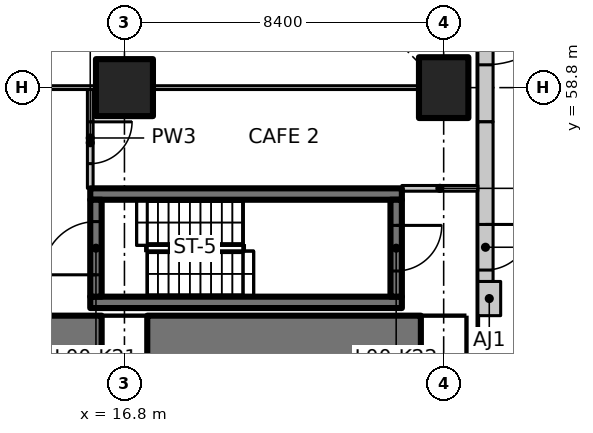
"""IFC4 building model, lengths in metres.
Left out: names, types, materials, properties, quantities, classifications, styles, units other than length and angle.
Written with IfcOpenShell. Run it as: python <this file> out.ifc"""

import sys

from ifc_helpers import new_model, si_unit, direction, frame, frame_2d, origin, origin_2d, place, context, subcontext, project, spatial, polyline, rectangle, outline, extrude, element, fill, save


model = new_model("IFC4")
c1 = context("Model", 3, precision=1e-05, world=origin(), true_north=direction((0.0, 1.0)))
c2 = subcontext(c1, "Body", "Model", "MODEL_VIEW")
j1 = project(units=[si_unit("LENGTHUNIT", "METRE"), si_unit("PLANEANGLEUNIT", "RADIAN")], contexts=[c1])
p1 = place(None, origin())
s1 = spatial("IfcSite", under=j1, at=p1, CompositionType="ELEMENT")
p2 = place(p1, origin())
s2 = spatial("IfcBuilding", under=s1, at=p2, CompositionType="ELEMENT")
p3 = place(p2, origin())
s3 = spatial("IfcBuildingStorey", under=s2, at=p3, CompositionType="ELEMENT", Elevation=0.0)
p4 = place(p3, frame((16.8, 58.8, 0.0), z_axis=(0.0, 0.0, 1.0), x_axis=(1.0, 0.0, 0.0)))
e1 = element("IfcColumn", 1, at=p4, inside=s3, PredefinedType="COLUMN", context=c2, shape_type="SweptSolid", body=[
    extrude(rectangle(XDim=1.5, YDim=1.5, at=origin_2d()), origin(), (0.0, 0.0, 1.0), 6.75),
])
p5 = place(p3, frame((25.2, 58.8, 0.0), z_axis=(0.0, 0.0, 1.0), x_axis=(1.0, 0.0, 0.0)))
e2 = element("IfcColumn", 2, at=p5, inside=s3, PredefinedType="COLUMN", context=c2, shape_type="SweptSolid", body=[
    extrude(rectangle(XDim=1.3, YDim=1.6, at=origin_2d()), origin(), (0.0, 0.0, 1.0), 6.75),
])
for number, where, z_axis, x_axis in (
    (3, (16.2, 42.0, 0.0), (1.0, 0.0, 0.0), (0.0, 1.0, 0.0)),
    (4, (24.6, 42.0, 0.0), (1.0, 0.0, 0.0), (0.0, 1.0, 0.0)),
):
    element("IfcWall", number, at=place(p3, frame(where, z_axis=z_axis, x_axis=x_axis)), inside=s3, PredefinedType="SOLIDWALL", context=c2, shape_type="SweptSolid", body=[
        extrude(outline(polyline([(-10.8, -6.3), (10.8, -6.3), (10.8, 36.25), (-10.8, 36.25), (-10.8, -6.3)]), holes=[polyline([(-8.4, 0.0), (-8.4, 26.6), (-8.36, 27.423), (-8.239, 28.239), (-8.038, 29.038), (-7.76, 29.814), (-7.408, 30.56), (-6.984, 31.267), (-6.493, 31.929), (-5.94, 32.54), (-5.329, 33.093), (-4.667, 33.584), (-3.96, 34.008), (-3.215, 34.361), (-2.438, 34.638), (-1.639, 34.839), (-0.823, 34.959), (0.0, 35.0), (0.823, 34.959), (1.639, 34.839), (2.438, 34.638), (3.215, 34.361), (3.96, 34.008), (4.667, 33.584), (5.329, 33.093), (5.94, 32.54), (6.493, 31.929), (6.984, 31.267), (7.408, 30.56), (7.76, 29.814), (8.038, 29.038), (8.239, 28.239), (8.36, 27.423), (8.4, 26.6), (8.4, 0.0), (-8.4, 0.0)])]), origin(), (0.0, 0.0, 1.0), 1.2),
    ])
p6 = place(p3, frame((9.0, 51.6, -6.3), z_axis=(0.0, 0.0, 1.0), x_axis=(1.0, 0.0, 0.0)))
e5 = element("IfcWall", 5, at=p6, inside=s3, PredefinedType="SOLIDWALL", context=c2, shape_type="SweptSolid", body=[
    extrude(rectangle(XDim=7.2, YDim=2.4, at=frame_2d((3.6, 0.0))), origin(), (0.0, 0.0, 1.0), 42.55),
])
p7 = place(p3, frame((17.4, 51.6, -6.3), z_axis=(0.0, 0.0, 1.0), x_axis=(1.0, 0.0, 0.0)))
e6 = element("IfcWall", 6, at=p7, inside=s3, PredefinedType="SOLIDWALL", context=c2, shape_type="SweptSolid", body=[
    extrude(rectangle(XDim=7.2, YDim=2.4, at=frame_2d((3.6, 0.0))), origin(), (0.0, 0.0, 1.0), 42.55),
])
p8 = place(p3, frame((25.8, 42.0, 0.0), z_axis=(1.0, 0.0, 0.0), x_axis=(0.0, 1.0, 0.0)))
e7 = element("IfcWall", 7, at=p8, inside=s3, PredefinedType="SOLIDWALL", context=c2, shape_type="SweptSolid", body=[
    extrude(outline(polyline([(5.4, 35.953), (6.0, 35.58), (6.575, 35.168), (7.121, 34.72), (7.637, 34.237), (8.12, 33.721), (8.568, 33.175), (8.98, 32.6), (9.353, 32.0), (9.686, 31.377), (9.978, 30.733), (10.227, 30.072), (10.432, 29.395), (10.593, 28.707), (10.708, 28.01), (10.777, 27.306), (10.8, 26.6), (10.8, 0.0), (8.4, 0.0), (8.4, 26.6), (8.382, 27.149), (8.328, 27.696), (8.239, 28.239), (8.114, 28.774), (7.954, 29.3), (7.76, 29.814), (7.534, 30.315), (7.275, 30.8), (6.984, 31.267), (6.664, 31.714), (6.315, 32.138), (5.94, 32.54), (5.539, 32.915), (5.114, 33.264), (4.667, 33.584), (4.2, 33.875), (3.715, 34.134), (3.215, 34.361), (2.7, 34.554), (2.174, 34.714), (1.639, 34.839), (1.096, 34.928), (0.549, 34.982), (0.0, 35.0), (-0.549, 34.982), (-1.096, 34.928), (-1.639, 34.839), (-2.174, 34.714), (-2.7, 34.554), (-3.215, 34.361), (-3.715, 34.134), (-4.2, 33.875), (-4.667, 33.584), (-5.114, 33.264), (-5.539, 32.915), (-5.94, 32.54), (-6.315, 32.138), (-6.664, 31.714), (-6.984, 31.267), (-7.275, 30.8), (-7.534, 30.315), (-7.76, 29.814), (-7.954, 29.3), (-8.114, 28.774), (-8.239, 28.239), (-8.328, 27.696), (-8.382, 27.149), (-8.4, 26.6), (-8.4, 0.0), (-10.8, 0.0), (-10.8, 26.6), (-10.777, 27.306), (-10.708, 28.01), (-10.593, 28.707), (-10.432, 29.395), (-10.227, 30.072), (-9.978, 30.733), (-9.686, 31.377), (-9.353, 32.0), (-8.98, 32.6), (-8.568, 33.175), (-8.12, 33.721), (-7.637, 34.237), (-7.121, 34.72), (-6.575, 35.168), (-6.0, 35.58), (-5.4, 35.953), (-4.844, 36.25), (4.844, 36.25), (5.4, 35.953)])), origin(), (0.0, 0.0, 1.0), 0.9),
])
p9 = place(p3, frame((26.4, 52.8, 0.0), z_axis=(0.0, 0.0, 1.0), x_axis=(0.0, 1.0, 0.0)))
e8 = element("IfcWall", 8, at=p9, inside=s3, PredefinedType="SOLIDWALL", context=c2, shape_type="SweptSolid", body=[
    extrude(rectangle(XDim=0.9, YDim=0.6, at=frame_2d((0.45, 0.0))), origin(), (0.0, 0.0, 1.0), 36.23),
])
p10 = place(p3, frame((26.3, 62.1, 0.0), z_axis=(0.0, 0.0, 1.0), x_axis=(0.0, -1.0, 0.0)))
e9 = element("IfcWall", 9, at=p10, inside=s3, PredefinedType="SOLIDWALL", context=c2, shape_type="SweptSolid", body=[
    extrude(rectangle(XDim=4.2, YDim=0.4, at=frame_2d((2.1, 0.0))), origin(), (0.0, 0.0, 1.0), 6.75),
])
p11 = place(p10, frame((0.3, 0.0, 0.0)))
e10 = element("IfcOpeningElement", 10, at=p11, cuts=e9, PredefinedType="OPENING", context=c2, shape_type="SweptSolid", body=[
    extrude(rectangle(XDim=2.4, YDim=2.7, at=frame_2d((1.2, 1.35))), frame((0.0, 0.21, 0.0), z_axis=(0.0, -1.0, 0.0), x_axis=(1.0, 0.0, 0.0)), (0.0, 0.0, 1.0), 0.42),
])
p12 = place(p3, frame((26.3, 57.9, 0.0), z_axis=(0.0, 0.0, 1.0), x_axis=(0.0, -1.0, 0.0)))
e11 = element("IfcWall", 11, at=p12, inside=s3, PredefinedType="SOLIDWALL", context=c2, shape_type="SweptSolid", body=[
    extrude(rectangle(XDim=4.2, YDim=0.4, at=frame_2d((2.1, 0.0))), origin(), (0.0, 0.0, 1.0), 6.75),
])
p13 = place(p12, frame((2.7, 0.0, 0.0)))
e12 = element("IfcOpeningElement", 12, at=p13, cuts=e11, PredefinedType="OPENING", context=c2, shape_type="SweptSolid", body=[
    extrude(rectangle(XDim=1.2, YDim=2.4, at=frame_2d((0.6, 1.2))), frame((0.0, 0.21, 0.0), z_axis=(0.0, -1.0, 0.0), x_axis=(1.0, 0.0, 0.0)), (0.0, 0.0, 1.0), 0.42),
])
for number, where, z_axis, x_axis in (
    (13, (15.9, 53.15, 0.0), (0.0, 0.0, 1.0), (1.0, 0.0, 0.0)),
    (14, (15.9, 56.0, 0.0), (0.0, 0.0, 1.0), (1.0, 0.0, 0.0)),
):
    element("IfcWall", number, at=place(p3, frame(where, z_axis=z_axis, x_axis=x_axis)), inside=s3, PredefinedType="SHEAR", context=c2, shape_type="SweptSolid", body=[
        extrude(rectangle(XDim=8.2, YDim=0.3, at=frame_2d((4.1, 0.0))), origin(), (0.0, 0.0, 1.0), 6.75),
    ])
p14 = place(p3, frame((16.05, 53.3, 0.0), z_axis=(0.0, 0.0, 1.0), x_axis=(0.0, 1.0, 0.0)))
e15 = element("IfcWall", 15, at=p14, inside=s3, PredefinedType="SHEAR", context=c2, shape_type="SweptSolid", body=[
    extrude(rectangle(XDim=2.55, YDim=0.3, at=frame_2d((1.275, 0.0))), origin(), (0.0, 0.0, 1.0), 6.75),
])
p15 = place(p14, frame((0.575, 0.0, 0.0)))
e16 = element("IfcOpeningElement", 16, at=p15, cuts=e15, PredefinedType="OPENING", context=c2, shape_type="SweptSolid", body=[
    extrude(rectangle(XDim=1.4, YDim=2.1, at=frame_2d((0.7, 1.05))), frame((0.0, 0.16, 0.0), z_axis=(0.0, -1.0, 0.0), x_axis=(1.0, 0.0, 0.0)), (0.0, 0.0, 1.0), 0.32),
])
p16 = place(p3, frame((23.95, 55.85, 0.0), z_axis=(0.0, 0.0, 1.0), x_axis=(0.0, -1.0, 0.0)))
e17 = element("IfcWall", 17, at=p16, inside=s3, PredefinedType="SHEAR", context=c2, shape_type="SweptSolid", body=[
    extrude(rectangle(XDim=2.55, YDim=0.3, at=frame_2d((1.275, 0.0))), origin(), (0.0, 0.0, 1.0), 6.75),
])
p17 = place(p16, frame((0.675, 0.0, 0.0)))
e18 = element("IfcOpeningElement", 18, at=p17, cuts=e17, PredefinedType="OPENING", context=c2, shape_type="SweptSolid", body=[
    extrude(rectangle(XDim=1.2, YDim=2.1, at=frame_2d((0.6, 1.05))), frame((0.0, 0.16, 0.0), z_axis=(0.0, -1.0, 0.0), x_axis=(1.0, 0.0, 0.0)), (0.0, 0.0, 1.0), 0.32),
])
p18 = place(p3, frame((24.1, 56.15, 0.0), z_axis=(0.0, 0.0, 1.0), x_axis=(1.0, 0.0, 0.0)))
e19 = element("IfcWall", 19, at=p18, inside=s3, PredefinedType="PARTITIONING", context=c2, shape_type="SweptSolid", body=[
    extrude(rectangle(XDim=2.0, YDim=0.15, at=frame_2d((1.0, 0.0))), origin(), (0.0, 0.0, 1.0), 6.73),
])
p19 = place(p3, frame((15.9, 58.8, 0.0), z_axis=(0.0, 0.0, 1.0), x_axis=(0.0, -1.0, 0.0)))
e20 = element("IfcWall", 20, at=p19, inside=s3, PredefinedType="PARTITIONING", context=c2, shape_type="SweptSolid", body=[
    extrude(rectangle(XDim=2.65, YDim=0.15, at=frame_2d((1.325, 0.0))), origin(), (0.0, 0.0, 1.0), 6.73),
])
p20 = place(p19, frame((0.9, 0.0, 0.0)))
e21 = element("IfcOpeningElement", 21, at=p20, cuts=e20, PredefinedType="OPENING", context=c2, shape_type="SweptSolid", body=[
    extrude(rectangle(XDim=1.1, YDim=2.1, at=frame_2d((0.55, 1.05))), frame((0.0, 0.085, 0.0), z_axis=(0.0, -1.0, 0.0), x_axis=(1.0, 0.0, 0.0)), (0.0, 0.0, 1.0), 0.17),
])
p21 = place(p3, frame((14.4, 58.8, 0.0), z_axis=(0.0, 0.0, 1.0), x_axis=(1.0, 0.0, 0.0)))
e22 = element("IfcWall", 22, at=p21, inside=s3, PredefinedType="PARTITIONING", context=c2, shape_type="SweptSolid", body=[
    extrude(rectangle(XDim=1.63, YDim=0.1, at=frame_2d((0.815, 0.0))), origin(), (0.0, 0.0, 1.0), 6.73),
])
p22 = place(p3, frame((17.57, 58.8, 0.0), z_axis=(0.0, 0.0, 1.0), x_axis=(1.0, 0.0, 0.0)))
e23 = element("IfcWall", 23, at=p22, inside=s3, PredefinedType="PARTITIONING", context=c2, shape_type="SweptSolid", body=[
    extrude(rectangle(XDim=6.96, YDim=0.1, at=frame_2d((3.48, 0.0))), origin(), (0.0, 0.0, 1.0), 6.73),
])
p23 = place(p11, origin())
e24 = element("IfcDoor", 24, at=p23, inside=s3, OperationType="DOUBLE_DOOR_SINGLE_SWING", PredefinedType="DOOR", context=c2, shape_type="SweptSolid", body=[
    extrude(rectangle(XDim=2.4, YDim=2.7, at=frame_2d((1.2, 1.35))), frame((0.0, 0.025, 0.0), z_axis=(0.0, -1.0, 0.0), x_axis=(1.0, 0.0, 0.0)), (0.0, 0.0, 1.0), 0.05),
])
fill(e10, e24)
p24 = place(p13, origin())
e25 = element("IfcDoor", 25, at=p24, inside=s3, OperationType="SINGLE_SWING_LEFT", PredefinedType="DOOR", context=c2, shape_type="SweptSolid", body=[
    extrude(rectangle(XDim=1.2, YDim=2.4, at=frame_2d((0.6, 1.2))), frame((0.0, 0.025, 0.0), z_axis=(0.0, -1.0, 0.0), x_axis=(1.0, 0.0, 0.0)), (0.0, 0.0, 1.0), 0.05),
])
fill(e12, e25)
p25 = place(p15, origin())
e26 = element("IfcDoor", 26, at=p25, inside=s3, OperationType="SINGLE_SWING_RIGHT", PredefinedType="DOOR", context=c2, shape_type="SweptSolid", body=[
    extrude(rectangle(XDim=1.4, YDim=2.1, at=frame_2d((0.7, 1.05))), frame((0.0, 0.025, 0.0), z_axis=(0.0, -1.0, 0.0), x_axis=(1.0, 0.0, 0.0)), (0.0, 0.0, 1.0), 0.05),
])
fill(e16, e26)
p26 = place(p17, origin())
e27 = element("IfcDoor", 27, at=p26, inside=s3, OperationType="SINGLE_SWING_LEFT", PredefinedType="DOOR", context=c2, shape_type="SweptSolid", body=[
    extrude(rectangle(XDim=1.2, YDim=2.1, at=frame_2d((0.6, 1.05))), frame((0.0, 0.025, 0.0), z_axis=(0.0, -1.0, 0.0), x_axis=(1.0, 0.0, 0.0)), (0.0, 0.0, 1.0), 0.05),
])
fill(e18, e27)
p27 = place(p20, origin())
e28 = element("IfcDoor", 28, at=p27, inside=s3, OperationType="SINGLE_SWING_LEFT", PredefinedType="DOOR", context=c2, shape_type="SweptSolid", body=[
    extrude(rectangle(XDim=1.1, YDim=2.1, at=frame_2d((0.55, 1.05))), frame((0.0, 0.025, 0.0), z_axis=(0.0, -1.0, 0.0), x_axis=(1.0, 0.0, 0.0)), (0.0, 0.0, 1.0), 0.05),
])
fill(e21, e28)
save(model, sys.argv[1])
